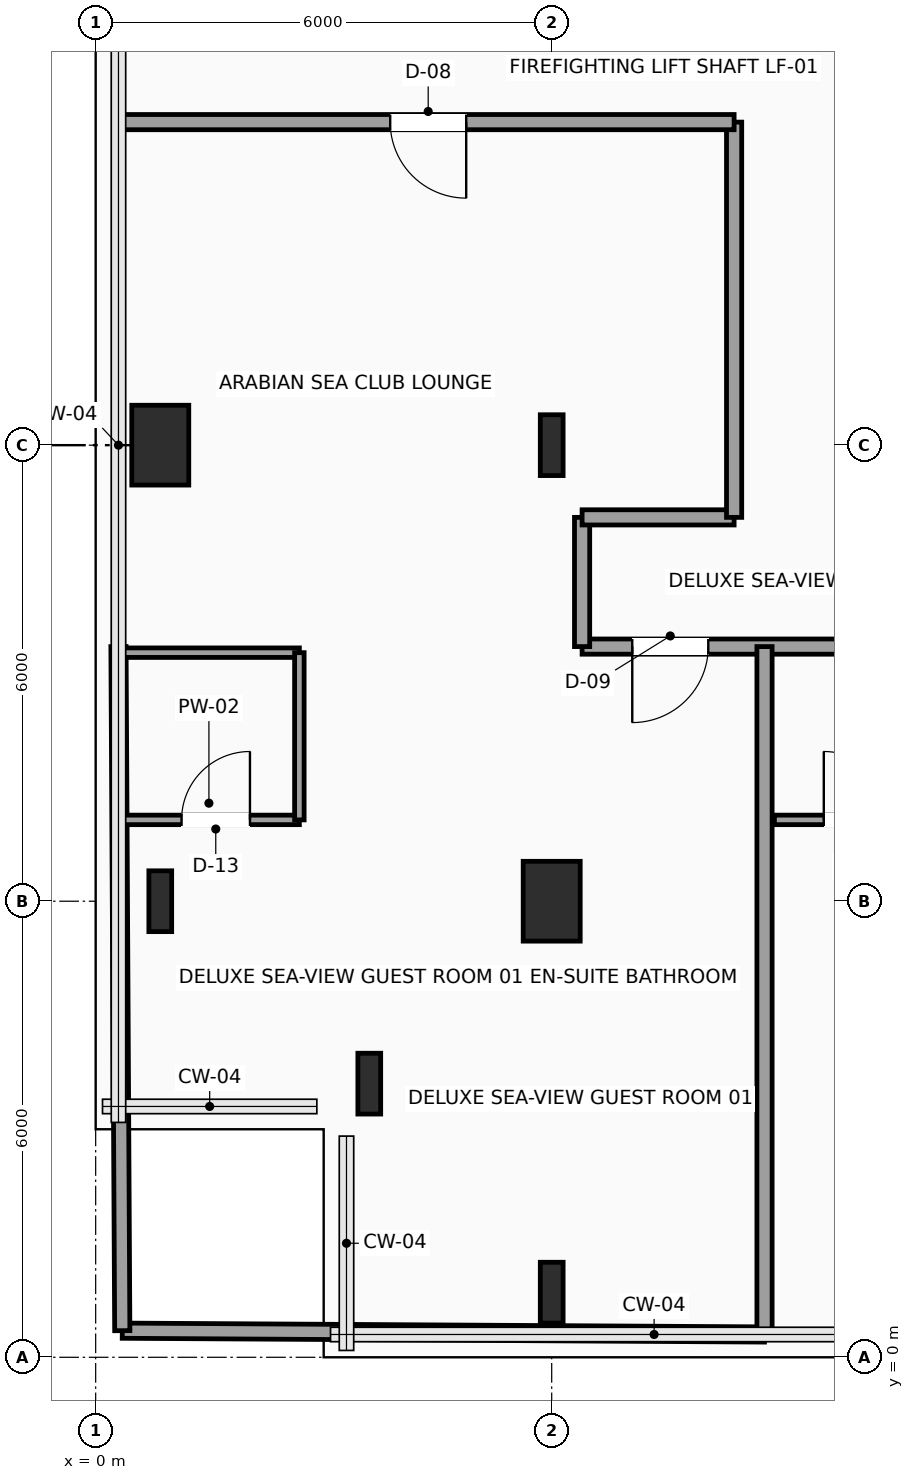
"""IFC4 building model, lengths in metres.
Left out: names, types, materials, properties, quantities, classifications, styles, units other than length and angle.
Written with IfcOpenShell. Run it as: python <this file> out.ifc"""

import sys

from ifc_helpers import new_model, si_unit, direction, frame, frame_2d, origin, origin_2d, place, context, subcontext, project, spatial, rectangle, i_section, extrude, element, fill, save


model = new_model("IFC4")
c1 = context("Model", 3, precision=1e-05, world=origin(), true_north=direction((0.0, 1.0)))
c2 = subcontext(c1, "Body", "Model", "MODEL_VIEW")
j1 = project(units=[si_unit("LENGTHUNIT", "METRE"), si_unit("PLANEANGLEUNIT", "RADIAN")], contexts=[c1])
p1 = place(None, origin())
s1 = spatial("IfcSite", under=j1, at=p1, CompositionType="ELEMENT")
p2 = place(p1, origin())
s2 = spatial("IfcBuilding", under=s1, at=p2, CompositionType="ELEMENT")
p3 = place(p2, frame((0.0, 0.0, 169.2)))
s3 = spatial("IfcBuildingStorey", under=s2, at=p3, CompositionType="ELEMENT", Elevation=169.2)
for number, where, z_axis, x_axis in (
    (1, (3.6, 3.6, 0.0), (0.0, 0.0, 1.0), (1.0, 0.0, 0.0)),
    (2, (0.85, 6.0, 0.0), (0.0, 0.0, 1.0), (1.0, 0.0, 0.0)),
):
    element("IfcColumn", number, at=place(p3, frame(where, z_axis=z_axis, x_axis=x_axis)), inside=s3, PredefinedType="COLUMN", context=c2, shape_type="SweptSolid", body=[
        extrude(i_section(OverallWidth=0.3, OverallDepth=0.8, WebThickness=0.018, FlangeThickness=0.033, FilletRadius=0.03, at=origin_2d()), origin(), (0.0, 0.0, 1.0), 3.75),
    ])
p4 = place(p3, frame((0.85, 12.0, 0.0), z_axis=(0.0, 0.0, 1.0), x_axis=(1.0, 0.0, 0.0)))
e3 = element("IfcColumn", 3, at=p4, inside=s3, PredefinedType="COLUMN", context=c2, shape_type="SweptSolid", body=[
    extrude(rectangle(XDim=0.75, YDim=1.05, at=origin_2d()), origin(), (0.0, 0.0, 1.0), 3.75),
])
p5 = place(p3, frame((6.0, 0.85, 0.0), z_axis=(0.0, 0.0, 1.0), x_axis=(1.0, 0.0, 0.0)))
e4 = element("IfcColumn", 4, at=p5, inside=s3, PredefinedType="COLUMN", context=c2, shape_type="SweptSolid", body=[
    extrude(i_section(OverallWidth=0.3, OverallDepth=0.8, WebThickness=0.018, FlangeThickness=0.033, FilletRadius=0.03, at=origin_2d()), origin(), (0.0, 0.0, 1.0), 3.75),
])
p6 = place(p3, frame((6.0, 6.0, 0.0), z_axis=(0.0, 0.0, 1.0), x_axis=(1.0, 0.0, 0.0)))
e5 = element("IfcColumn", 5, at=p6, inside=s3, PredefinedType="COLUMN", context=c2, shape_type="SweptSolid", body=[
    extrude(rectangle(XDim=0.75, YDim=1.05, at=origin_2d()), origin(), (0.0, 0.0, 1.0), 3.75),
])
p7 = place(p3, frame((6.0, 12.0, 0.0), z_axis=(0.0, 0.0, 1.0), x_axis=(1.0, 0.0, 0.0)))
e6 = element("IfcColumn", 6, at=p7, inside=s3, PredefinedType="COLUMN", context=c2, shape_type="SweptSolid", body=[
    extrude(i_section(OverallWidth=0.3, OverallDepth=0.8, WebThickness=0.018, FlangeThickness=0.033, FilletRadius=0.03, at=origin_2d()), origin(), (0.0, 0.0, 1.0), 3.75),
])
p8 = place(p3, frame((22.25, 9.35, 0.0), z_axis=(0.0, 0.0, 1.0), x_axis=(-1.0, 0.0, 0.0)))
e7 = element("IfcWall", 7, at=p8, inside=s3, PredefinedType="PARTITIONING", context=c2, shape_type="SweptSolid", body=[
    extrude(rectangle(XDim=15.85, YDim=0.2, at=frame_2d((7.925, 0.0))), origin(), (0.0, 0.0, 1.0), 3.54),
])
p9 = place(p8, frame((14.19, 0.0, 0.0)))
e8 = element("IfcOpeningElement", 8, at=p9, cuts=e7, PredefinedType="OPENING", context=c2, shape_type="SweptSolid", body=[
    extrude(rectangle(XDim=1.0, YDim=2.2, at=frame_2d((0.5, 1.1))), frame((0.0, 0.11, 0.0), z_axis=(0.0, -1.0, 0.0), x_axis=(1.0, 0.0, 0.0)), (0.0, 0.0, 1.0), 0.22),
])
p10 = place(p8, frame((8.265, 0.0, 0.0)))
e9 = element("IfcOpeningElement", 9, at=p10, cuts=e7, PredefinedType="OPENING", context=c2, shape_type="SweptSolid", body=[
    extrude(rectangle(XDim=1.0, YDim=2.2, at=frame_2d((0.5, 1.1))), frame((0.0, 0.11, 0.0), z_axis=(0.0, -1.0, 0.0), x_axis=(1.0, 0.0, 0.0)), (0.0, 0.0, 1.0), 0.22),
])
p11 = place(p8, frame((1.54, 0.0, 0.0)))
e10 = element("IfcOpeningElement", 10, at=p11, cuts=e7, PredefinedType="OPENING", context=c2, shape_type="SweptSolid", body=[
    extrude(rectangle(XDim=1.0, YDim=2.2, at=frame_2d((0.5, 1.1))), frame((0.0, 0.11, 0.0), z_axis=(0.0, -1.0, 0.0), x_axis=(1.0, 0.0, 0.0)), (0.0, 0.0, 1.0), 0.22),
])
p12 = place(p3, frame((6.4, 9.35, 0.0), z_axis=(0.0, 0.0, 1.0), x_axis=(0.0, 1.0, 0.0)))
e11 = element("IfcWall", 11, at=p12, inside=s3, PredefinedType="PARTITIONING", context=c2, shape_type="SweptSolid", body=[
    extrude(rectangle(XDim=1.7, YDim=0.2, at=frame_2d((0.85, 0.0))), origin(), (0.0, 0.0, 1.0), 3.54),
])
p13 = place(p3, frame((6.4, 11.05, 0.0), z_axis=(0.0, 0.0, 1.0), x_axis=(1.0, 0.0, 0.0)))
e12 = element("IfcWall", 12, at=p13, inside=s3, PredefinedType="PARTITIONING", context=c2, shape_type="SweptSolid", body=[
    extrude(rectangle(XDim=2.0, YDim=0.2, at=frame_2d((1.0, 0.0))), origin(), (0.0, 0.0, 1.0), 3.54),
])
p14 = place(p3, frame((8.4, 11.05, 0.0), z_axis=(0.0, 0.0, 1.0), x_axis=(0.0, 1.0, 0.0)))
e13 = element("IfcWall", 13, at=p14, inside=s3, PredefinedType="PARTITIONING", context=c2, shape_type="SweptSolid", body=[
    extrude(rectangle(XDim=5.2, YDim=0.2, at=frame_2d((2.6, 0.0))), origin(), (0.0, 0.0, 1.0), 3.54),
])
p15 = place(p3, frame((8.4, 16.25, 0.0), z_axis=(0.0, 0.0, 1.0), x_axis=(-1.0, 0.0, 0.0)))
e14 = element("IfcWall", 14, at=p15, inside=s3, PredefinedType="PARTITIONING", context=c2, shape_type="SweptSolid", body=[
    extrude(rectangle(XDim=8.1, YDim=0.2, at=frame_2d((4.05, 0.0))), origin(), (0.0, 0.0, 1.0), 3.54),
])
p16 = place(p15, frame((3.525, 0.0, 0.0)))
e15 = element("IfcOpeningElement", 15, at=p16, cuts=e14, PredefinedType="OPENING", context=c2, shape_type="SweptSolid", body=[
    extrude(rectangle(XDim=1.0, YDim=2.2, at=frame_2d((0.5, 1.1))), frame((0.0, 0.11, 0.0), z_axis=(0.0, -1.0, 0.0), x_axis=(1.0, 0.0, 0.0)), (0.0, 0.0, 1.0), 0.22),
])
p17 = place(p3, frame((0.35, 0.35, 0.0), z_axis=(0.0, 0.0, 1.0), x_axis=(0.99998245966, -0.005922868574, 0.0)))
e16 = element("IfcWall", 16, at=p17, inside=s3, PredefinedType="PARTITIONING", context=c2, shape_type="SweptSolid", body=[
    extrude(rectangle(XDim=8.45, YDim=0.2, at=frame_2d((4.225, 0.0))), origin(), (0.0, 0.0, 1.0), 3.54),
])
p18 = place(p3, frame((0.35, 0.35, 0.0), z_axis=(0.0, 0.0, 1.0), x_axis=(-0.005560894919, 0.999984538104, 0.0)))
e17 = element("IfcWall", 17, at=p18, inside=s3, PredefinedType="PARTITIONING", context=c2, shape_type="SweptSolid", body=[
    extrude(rectangle(XDim=9.0, YDim=0.2, at=frame_2d((4.5, 0.0))), origin(), (0.0, 0.0, 1.0), 3.54),
])
p19 = place(p3, frame((8.8, 0.3, 0.0), z_axis=(0.0, 0.0, 1.0), x_axis=(0.0, 1.0, 0.0)))
e18 = element("IfcWall", 18, at=p19, inside=s3, PredefinedType="PARTITIONING", context=c2, shape_type="SweptSolid", body=[
    extrude(rectangle(XDim=9.05, YDim=0.2, at=frame_2d((4.525, 0.0))), origin(), (0.0, 0.0, 1.0), 3.54),
])
p20 = place(p3, frame((0.3, 7.07, 0.0), z_axis=(0.0, 0.0, 1.0), x_axis=(1.0, 0.0, 0.0)))
e19 = element("IfcWall", 19, at=p20, inside=s3, PredefinedType="PARTITIONING", context=c2, shape_type="SweptSolid", body=[
    extrude(rectangle(XDim=2.38, YDim=0.125, at=frame_2d((1.19, 0.0))), origin(), (0.0, 0.0, 1.0), 3.54),
])
p21 = place(p20, frame((0.83, 0.0, 0.0)))
e20 = element("IfcOpeningElement", 20, at=p21, cuts=e19, PredefinedType="OPENING", context=c2, shape_type="SweptSolid", body=[
    extrude(rectangle(XDim=0.9, YDim=2.1, at=frame_2d((0.45, 1.05))), frame((0.0, 0.073, 0.0), z_axis=(0.0, -1.0, 0.0), x_axis=(1.0, 0.0, 0.0)), (0.0, 0.0, 1.0), 0.145),
])
p22 = place(p3, frame((0.3, 9.27, 0.0), z_axis=(0.0, 0.0, 1.0), x_axis=(1.0, 0.0, 0.0)))
e21 = element("IfcWall", 21, at=p22, inside=s3, PredefinedType="PARTITIONING", context=c2, shape_type="SweptSolid", body=[
    extrude(rectangle(XDim=2.38, YDim=0.125, at=frame_2d((1.19, 0.0))), origin(), (0.0, 0.0, 1.0), 3.54),
])
p23 = place(p3, frame((2.68, 7.07, 0.0), z_axis=(0.0, 0.0, 1.0), x_axis=(0.0, 1.0, 0.0)))
e22 = element("IfcWall", 22, at=p23, inside=s3, PredefinedType="PARTITIONING", context=c2, shape_type="SweptSolid", body=[
    extrude(rectangle(XDim=2.2, YDim=0.125, at=frame_2d((1.1, 0.0))), origin(), (0.0, 0.0, 1.0), 3.54),
])
p24 = place(p3, frame((8.93, 7.07, 0.0), z_axis=(0.0, 0.0, 1.0), x_axis=(1.0, 0.0, 0.0)))
e23 = element("IfcWall", 23, at=p24, inside=s3, PredefinedType="PARTITIONING", context=c2, shape_type="SweptSolid", body=[
    extrude(rectangle(XDim=2.2, YDim=0.125, at=frame_2d((1.1, 0.0))), origin(), (0.0, 0.0, 1.0), 3.54),
])
p25 = place(p24, frame((0.65, 0.0, 0.0)))
e24 = element("IfcOpeningElement", 24, at=p25, cuts=e23, PredefinedType="OPENING", context=c2, shape_type="SweptSolid", body=[
    extrude(rectangle(XDim=0.9, YDim=2.1, at=frame_2d((0.45, 1.05))), frame((0.0, 0.073, 0.0), z_axis=(0.0, -1.0, 0.0), x_axis=(1.0, 0.0, 0.0)), (0.0, 0.0, 1.0), 0.145),
])
p26 = place(p9, origin())
e25 = element("IfcDoor", 25, at=p26, inside=s3, OperationType="SINGLE_SWING_RIGHT", PredefinedType="DOOR", context=c2, shape_type="SweptSolid", body=[
    extrude(rectangle(XDim=1.0, YDim=2.2, at=frame_2d((0.5, 1.1))), frame((0.0, 0.025, 0.0), z_axis=(0.0, -1.0, 0.0), x_axis=(1.0, 0.0, 0.0)), (0.0, 0.0, 1.0), 0.05),
])
fill(e8, e25)
p27 = place(p16, origin())
e26 = element("IfcDoor", 26, at=p27, inside=s3, OperationType="SINGLE_SWING_LEFT", PredefinedType="DOOR", context=c2, shape_type="SweptSolid", body=[
    extrude(rectangle(XDim=1.0, YDim=2.2, at=frame_2d((0.5, 1.1))), frame((0.0, 0.025, 0.0), z_axis=(0.0, -1.0, 0.0), x_axis=(1.0, 0.0, 0.0)), (0.0, 0.0, 1.0), 0.05),
])
fill(e15, e26)
p28 = place(p21, origin())
e27 = element("IfcDoor", 27, at=p28, inside=s3, OperationType="SINGLE_SWING_RIGHT", PredefinedType="DOOR", context=c2, shape_type="SweptSolid", body=[
    extrude(rectangle(XDim=0.9, YDim=2.1, at=frame_2d((0.45, 1.05))), frame((0.0, 0.025, 0.0), z_axis=(0.0, -1.0, 0.0), x_axis=(1.0, 0.0, 0.0)), (0.0, 0.0, 1.0), 0.05),
])
fill(e20, e27)
p29 = place(p25, origin())
e28 = element("IfcDoor", 28, at=p29, inside=s3, OperationType="SINGLE_SWING_LEFT", PredefinedType="DOOR", context=c2, shape_type="SweptSolid", body=[
    extrude(rectangle(XDim=0.9, YDim=2.1, at=frame_2d((0.45, 1.05))), frame((0.0, 0.025, 0.0), z_axis=(0.0, -1.0, 0.0), x_axis=(1.0, 0.0, 0.0)), (0.0, 0.0, 1.0), 0.05),
])
fill(e24, e28)
save(model, sys.argv[1])
